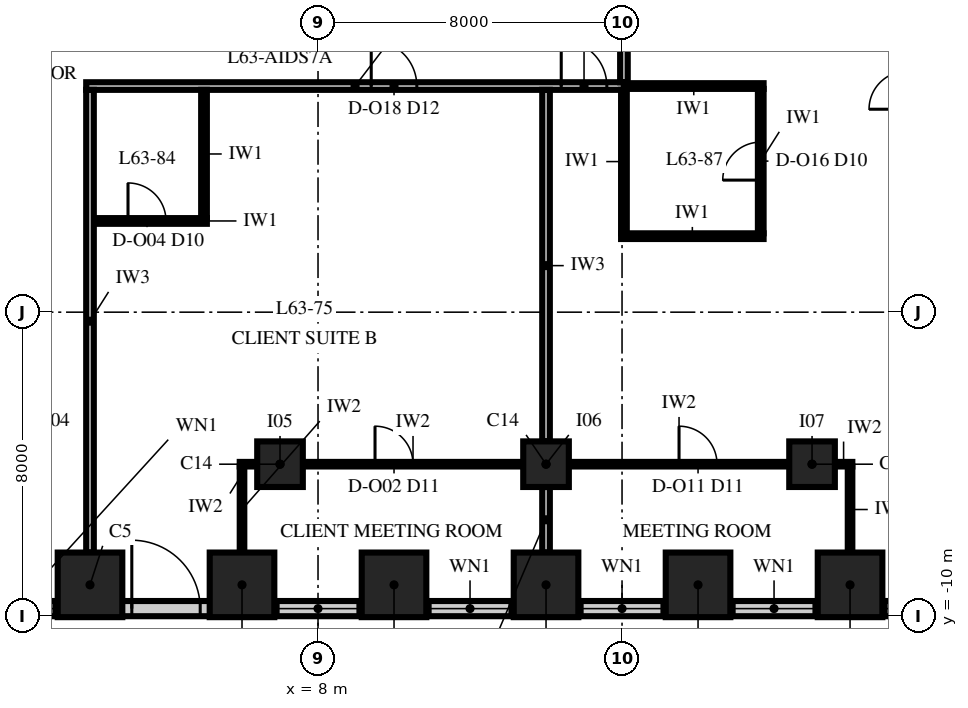
"""IFC4 building model, lengths in metres.
Left out: names, types, materials, properties, quantities, classifications, styles, units other than length and angle.
Written with IfcOpenShell. Run it as: python <this file> out.ifc"""

import sys

from ifc_helpers import new_model, si_unit, direction, frame, frame_2d, origin, origin_2d, place, context, subcontext, project, spatial, rectangle, extrude, element, fill, save


model = new_model("IFC4")
c1 = context("Model", 3, precision=1e-05, world=origin(), true_north=direction((0.0, 1.0)))
c2 = subcontext(c1, "Body", "Model", "MODEL_VIEW")
j1 = project(units=[si_unit("LENGTHUNIT", "METRE"), si_unit("PLANEANGLEUNIT", "RADIAN")], contexts=[c1])
p1 = place(None, origin())
s1 = spatial("IfcSite", under=j1, at=p1, CompositionType="ELEMENT")
p2 = place(p1, origin())
s2 = spatial("IfcBuilding", under=s1, at=p2, CompositionType="ELEMENT")
p3 = place(p2, frame((0.0, 0.0, 272.0)))
s3 = spatial("IfcBuildingStorey", under=s2, at=p3, CompositionType="ELEMENT", Elevation=272.0)
for number, where, z_axis, x_axis in (
    (1, (2.0, -9.175, -0.25), (0.0, 0.0, 1.0), (1.0, 0.0, 0.0)),
    (2, (6.0, -9.175, -0.25), (0.0, 0.0, 1.0), (1.0, 0.0, 0.0)),
    (3, (10.0, -9.175, -0.25), (0.0, 0.0, 1.0), (1.0, 0.0, 0.0)),
    (4, (14.0, -9.175, -0.25), (0.0, 0.0, 1.0), (1.0, 0.0, 0.0)),
    (5, (18.0, -9.175, -0.25), (0.0, 0.0, 1.0), (1.0, 0.0, 0.0)),
    (6, (22.0, -9.175, -0.25), (0.0, 0.0, 1.0), (1.0, 0.0, 0.0)),
):
    element("IfcColumn", number, at=place(p3, frame(where, z_axis=z_axis, x_axis=x_axis)), inside=s3, PredefinedType="COLUMN", context=c2, shape_type="SweptSolid", body=[
        extrude(rectangle(XDim=1.7, YDim=1.7, at=origin_2d()), origin(), (0.0, 0.0, 1.0), 4.25),
    ])
for number, where, z_axis, x_axis in (
    (7, (7.0, -6.0, 0.0), (0.0, 0.0, 1.0), (1.0, 0.0, 0.0)),
    (8, (14.0, -6.0, 0.0), (0.0, 0.0, 1.0), (1.0, 0.0, 0.0)),
    (9, (21.0, -6.0, 0.0), (0.0, 0.0, 1.0), (1.0, 0.0, 0.0)),
):
    element("IfcColumn", number, at=place(p3, frame(where, z_axis=z_axis, x_axis=x_axis)), inside=s3, PredefinedType="COLUMN", context=c2, shape_type="SweptSolid", body=[
        extrude(rectangle(XDim=1.2, YDim=1.2, at=origin_2d()), origin(), (0.0, 0.0, 1.0), 4.0),
    ])
p4 = place(p3, frame((-26.0, -9.8, 0.0), z_axis=(0.0, 0.0, 1.0), x_axis=(1.0, 0.0, 0.0)))
e10 = element("IfcWall", 10, at=p4, inside=s3, PredefinedType="SOLIDWALL", context=c2, shape_type="SweptSolid", body=[
    extrude(rectangle(XDim=52.0, YDim=0.4, at=frame_2d((26.0, 0.0))), origin(), (0.0, 0.0, 1.0), 2.0),
])
p5 = place(p4, frame((0.95, 0.0, 0.8)))
e11 = element("IfcOpeningElement", 11, at=p5, cuts=e10, PredefinedType="OPENING", context=c2, shape_type="SweptSolid", body=[
    extrude(rectangle(XDim=2.1, YDim=1.15, at=frame_2d((1.05, 0.575))), frame((0.0, 0.215, 0.0), z_axis=(0.0, -1.0, 0.0), x_axis=(1.0, 0.0, 0.0)), (0.0, 0.0, 1.0), 0.43),
])
p6 = place(p4, frame((4.95, 0.0, 0.8)))
e12 = element("IfcOpeningElement", 12, at=p6, cuts=e10, PredefinedType="OPENING", context=c2, shape_type="SweptSolid", body=[
    extrude(rectangle(XDim=2.1, YDim=1.15, at=frame_2d((1.05, 0.575))), frame((0.0, 0.215, 0.0), z_axis=(0.0, -1.0, 0.0), x_axis=(1.0, 0.0, 0.0)), (0.0, 0.0, 1.0), 0.43),
])
p7 = place(p4, frame((8.95, 0.0, 0.8)))
e13 = element("IfcOpeningElement", 13, at=p7, cuts=e10, PredefinedType="OPENING", context=c2, shape_type="SweptSolid", body=[
    extrude(rectangle(XDim=2.1, YDim=1.15, at=frame_2d((1.05, 0.575))), frame((0.0, 0.215, 0.0), z_axis=(0.0, -1.0, 0.0), x_axis=(1.0, 0.0, 0.0)), (0.0, 0.0, 1.0), 0.43),
])
p8 = place(p4, frame((12.95, 0.0, 0.8)))
e14 = element("IfcOpeningElement", 14, at=p8, cuts=e10, PredefinedType="OPENING", context=c2, shape_type="SweptSolid", body=[
    extrude(rectangle(XDim=2.1, YDim=1.15, at=frame_2d((1.05, 0.575))), frame((0.0, 0.215, 0.0), z_axis=(0.0, -1.0, 0.0), x_axis=(1.0, 0.0, 0.0)), (0.0, 0.0, 1.0), 0.43),
])
p9 = place(p4, frame((16.95, 0.0, 0.8)))
e15 = element("IfcOpeningElement", 15, at=p9, cuts=e10, PredefinedType="OPENING", context=c2, shape_type="SweptSolid", body=[
    extrude(rectangle(XDim=2.1, YDim=1.15, at=frame_2d((1.05, 0.575))), frame((0.0, 0.215, 0.0), z_axis=(0.0, -1.0, 0.0), x_axis=(1.0, 0.0, 0.0)), (0.0, 0.0, 1.0), 0.43),
])
p10 = place(p4, frame((21.1, 0.0, 0.0)))
e16 = element("IfcOpeningElement", 16, at=p10, cuts=e10, PredefinedType="OPENING", context=c2, shape_type="SweptSolid", body=[
    extrude(rectangle(XDim=1.8, YDim=2.0, at=frame_2d((0.9, 1.0))), frame((0.0, 0.215, 0.0), z_axis=(0.0, -1.0, 0.0), x_axis=(1.0, 0.0, 0.0)), (0.0, 0.0, 1.0), 0.43),
])
p11 = place(p4, frame((24.95, 0.0, 0.8)))
e17 = element("IfcOpeningElement", 17, at=p11, cuts=e10, PredefinedType="OPENING", context=c2, shape_type="SweptSolid", body=[
    extrude(rectangle(XDim=2.1, YDim=1.15, at=frame_2d((1.05, 0.575))), frame((0.0, 0.215, 0.0), z_axis=(0.0, -1.0, 0.0), x_axis=(1.0, 0.0, 0.0)), (0.0, 0.0, 1.0), 0.43),
])
p12 = place(p4, frame((29.1, 0.0, 0.0)))
e18 = element("IfcOpeningElement", 18, at=p12, cuts=e10, PredefinedType="OPENING", context=c2, shape_type="SweptSolid", body=[
    extrude(rectangle(XDim=1.8, YDim=2.0, at=frame_2d((0.9, 1.0))), frame((0.0, 0.215, 0.0), z_axis=(0.0, -1.0, 0.0), x_axis=(1.0, 0.0, 0.0)), (0.0, 0.0, 1.0), 0.43),
])
p13 = place(p4, frame((32.95, 0.0, 0.8)))
e19 = element("IfcOpeningElement", 19, at=p13, cuts=e10, PredefinedType="OPENING", context=c2, shape_type="SweptSolid", body=[
    extrude(rectangle(XDim=2.1, YDim=1.15, at=frame_2d((1.05, 0.575))), frame((0.0, 0.215, 0.0), z_axis=(0.0, -1.0, 0.0), x_axis=(1.0, 0.0, 0.0)), (0.0, 0.0, 1.0), 0.43),
])
p14 = place(p4, frame((36.95, 0.0, 0.8)))
e20 = element("IfcOpeningElement", 20, at=p14, cuts=e10, PredefinedType="OPENING", context=c2, shape_type="SweptSolid", body=[
    extrude(rectangle(XDim=2.1, YDim=1.15, at=frame_2d((1.05, 0.575))), frame((0.0, 0.215, 0.0), z_axis=(0.0, -1.0, 0.0), x_axis=(1.0, 0.0, 0.0)), (0.0, 0.0, 1.0), 0.43),
])
p15 = place(p4, frame((40.95, 0.0, 0.8)))
e21 = element("IfcOpeningElement", 21, at=p15, cuts=e10, PredefinedType="OPENING", context=c2, shape_type="SweptSolid", body=[
    extrude(rectangle(XDim=2.1, YDim=1.15, at=frame_2d((1.05, 0.575))), frame((0.0, 0.215, 0.0), z_axis=(0.0, -1.0, 0.0), x_axis=(1.0, 0.0, 0.0)), (0.0, 0.0, 1.0), 0.43),
])
p16 = place(p4, frame((44.95, 0.0, 0.8)))
e22 = element("IfcOpeningElement", 22, at=p16, cuts=e10, PredefinedType="OPENING", context=c2, shape_type="SweptSolid", body=[
    extrude(rectangle(XDim=2.1, YDim=1.15, at=frame_2d((1.05, 0.575))), frame((0.0, 0.215, 0.0), z_axis=(0.0, -1.0, 0.0), x_axis=(1.0, 0.0, 0.0)), (0.0, 0.0, 1.0), 0.43),
])
p17 = place(p4, frame((48.95, 0.0, 0.8)))
e23 = element("IfcOpeningElement", 23, at=p17, cuts=e10, PredefinedType="OPENING", context=c2, shape_type="SweptSolid", body=[
    extrude(rectangle(XDim=2.1, YDim=1.15, at=frame_2d((1.05, 0.575))), frame((0.0, 0.215, 0.0), z_axis=(0.0, -1.0, 0.0), x_axis=(1.0, 0.0, 0.0)), (0.0, 0.0, 1.0), 0.43),
])
p18 = place(p3, frame((5.94, -6.0, 0.0), z_axis=(0.0, 0.0, 1.0), x_axis=(1.0, 0.0, 0.0)))
e24 = element("IfcWall", 24, at=p18, inside=s3, PredefinedType="PARTITIONING", context=c2, shape_type="SweptSolid", body=[
    extrude(rectangle(XDim=0.46, YDim=0.12, at=frame_2d((0.23, 0.0))), origin(), (0.0, 0.0, 1.0), 2.842),
])
p19 = place(p3, frame((7.6, -6.0, 0.0), z_axis=(0.0, 0.0, 1.0), x_axis=(1.0, 0.0, 0.0)))
e25 = element("IfcWall", 25, at=p19, inside=s3, PredefinedType="PARTITIONING", context=c2, shape_type="SweptSolid", body=[
    extrude(rectangle(XDim=5.8, YDim=0.12, at=frame_2d((2.9, 0.0))), origin(), (0.0, 0.0, 1.0), 2.842),
])
p20 = place(p19, frame((1.9, 0.0, 0.0)))
e26 = element("IfcOpeningElement", 26, at=p20, cuts=e25, PredefinedType="OPENING", context=c2, shape_type="SweptSolid", body=[
    extrude(rectangle(XDim=1.0, YDim=2.4, at=frame_2d((0.5, 1.2))), frame((0.0, 0.075, 0.0), z_axis=(0.0, -1.0, 0.0), x_axis=(1.0, 0.0, 0.0)), (0.0, 0.0, 1.0), 0.15),
])
p21 = place(p3, frame((14.6, -6.0, 0.0), z_axis=(0.0, 0.0, 1.0), x_axis=(1.0, 0.0, 0.0)))
e27 = element("IfcWall", 27, at=p21, inside=s3, PredefinedType="PARTITIONING", context=c2, shape_type="SweptSolid", body=[
    extrude(rectangle(XDim=5.8, YDim=0.12, at=frame_2d((2.9, 0.0))), origin(), (0.0, 0.0, 1.0), 2.842),
])
p22 = place(p21, frame((2.9, 0.0, 0.0)))
e28 = element("IfcOpeningElement", 28, at=p22, cuts=e27, PredefinedType="OPENING", context=c2, shape_type="SweptSolid", body=[
    extrude(rectangle(XDim=1.0, YDim=2.4, at=frame_2d((0.5, 1.2))), frame((0.0, 0.075, 0.0), z_axis=(0.0, -1.0, 0.0), x_axis=(1.0, 0.0, 0.0)), (0.0, 0.0, 1.0), 0.15),
])
p23 = place(p3, frame((21.6, -6.0, 0.0), z_axis=(0.0, 0.0, 1.0), x_axis=(1.0, 0.0, 0.0)))
e29 = element("IfcWall", 29, at=p23, inside=s3, PredefinedType="PARTITIONING", context=c2, shape_type="SweptSolid", body=[
    extrude(rectangle(XDim=0.46, YDim=0.12, at=frame_2d((0.23, 0.0))), origin(), (0.0, 0.0, 1.0), 2.842),
])
p24 = place(p3, frame((15.975, 0.0, 0.0), z_axis=(0.0, 0.0, 1.0), x_axis=(1.0, 0.0, 0.0)))
e30 = element("IfcWall", 30, at=p24, inside=s3, PredefinedType="PARTITIONING", context=c2, shape_type="SweptSolid", body=[
    extrude(rectangle(XDim=3.75, YDim=0.15, at=frame_2d((1.875, 0.0))), origin(), (0.0, 0.0, 1.0), 3.23),
])
p25 = place(p3, frame((2.1, 0.4, 0.0), z_axis=(0.0, 0.0, 1.0), x_axis=(1.0, 0.0, 0.0)))
e31 = element("IfcWall", 31, at=p25, inside=s3, PredefinedType="PARTITIONING", context=c2, shape_type="SweptSolid", body=[
    extrude(rectangle(XDim=2.975, YDim=0.15, at=frame_2d((1.487, 0.0))), origin(), (0.0, 0.0, 1.0), 3.23),
])
p26 = place(p25, frame((0.9, 0.0, 0.0)))
e32 = element("IfcOpeningElement", 32, at=p26, cuts=e31, PredefinedType="OPENING", context=c2, shape_type="SweptSolid", body=[
    extrude(rectangle(XDim=1.0, YDim=2.3, at=frame_2d((0.5, 1.15))), frame((0.0, 0.09, 0.0), z_axis=(0.0, -1.0, 0.0), x_axis=(1.0, 0.0, 0.0)), (0.0, 0.0, 1.0), 0.18),
])
p27 = place(p3, frame((1.9, 3.95, 0.0), z_axis=(0.0, 0.0, 1.0), x_axis=(1.0, 0.0, 0.0)))
e33 = element("IfcWall", 33, at=p27, inside=s3, PredefinedType="PARTITIONING", context=c2, shape_type="SweptSolid", body=[
    extrude(rectangle(XDim=14.15, YDim=0.2, at=frame_2d((7.075, 0.0))), origin(), (0.0, 0.0, 1.0), 3.23),
])
p28 = place(p27, frame((7.5, 0.0, 0.0)))
e34 = element("IfcOpeningElement", 34, at=p28, cuts=e33, PredefinedType="OPENING", context=c2, shape_type="SweptSolid", body=[
    extrude(rectangle(XDim=1.2, YDim=2.4, at=frame_2d((0.6, 1.2))), frame((0.0, 0.115, 0.0), z_axis=(0.0, -1.0, 0.0), x_axis=(1.0, 0.0, 0.0)), (0.0, 0.0, 1.0), 0.23),
])
p29 = place(p27, frame((12.5, 0.0, 0.0)))
e35 = element("IfcOpeningElement", 35, at=p29, cuts=e33, PredefinedType="OPENING", context=c2, shape_type="SweptSolid", body=[
    extrude(rectangle(XDim=1.2, YDim=2.4, at=frame_2d((0.6, 1.2))), frame((0.0, 0.115, 0.0), z_axis=(0.0, -1.0, 0.0), x_axis=(1.0, 0.0, 0.0)), (0.0, 0.0, 1.0), 0.23),
])
p30 = place(p3, frame((16.05, 3.95, 0.0), z_axis=(0.0, 0.0, 1.0), x_axis=(1.0, 0.0, 0.0)))
e36 = element("IfcWall", 36, at=p30, inside=s3, PredefinedType="PARTITIONING", context=c2, shape_type="SweptSolid", body=[
    extrude(rectangle(XDim=3.675, YDim=0.15, at=frame_2d((1.837, 0.0))), origin(), (0.0, 0.0, 1.0), 3.23),
])
p31 = place(p3, frame((2.0, -8.325, 0.0), z_axis=(0.0, 0.0, 1.0), x_axis=(0.0, 1.0, 0.0)))
e37 = element("IfcWall", 37, at=p31, inside=s3, PredefinedType="PARTITIONING", context=c2, shape_type="SweptSolid", body=[
    extrude(rectangle(XDim=12.175, YDim=0.2, at=frame_2d((6.087, 0.0))), origin(), (0.0, 0.0, 1.0), 2.842),
])
p32 = place(p3, frame((5.0, 0.475, 0.0), z_axis=(0.0, 0.0, 1.0), x_axis=(0.0, 1.0, 0.0)))
e38 = element("IfcWall", 38, at=p32, inside=s3, PredefinedType="PARTITIONING", context=c2, shape_type="SweptSolid", body=[
    extrude(rectangle(XDim=3.375, YDim=0.15, at=frame_2d((1.688, 0.0))), origin(), (0.0, 0.0, 1.0), 3.85),
])
p33 = place(p3, frame((6.0, -8.325, 0.0), z_axis=(0.0, 0.0, 1.0), x_axis=(0.0, 1.0, 0.0)))
e39 = element("IfcWall", 39, at=p33, inside=s3, PredefinedType="PARTITIONING", context=c2, shape_type="SweptSolid", body=[
    extrude(rectangle(XDim=2.265, YDim=0.12, at=frame_2d((1.132, 0.0))), origin(), (0.0, 0.0, 1.0), 2.842),
])
p34 = place(p3, frame((14.0, -8.325, 0.0), z_axis=(0.0, 0.0, 1.0), x_axis=(0.0, 1.0, 0.0)))
e40 = element("IfcWall", 40, at=p34, inside=s3, PredefinedType="PARTITIONING", context=c2, shape_type="SweptSolid", body=[
    extrude(rectangle(XDim=1.725, YDim=0.2, at=frame_2d((0.862, 0.0))), origin(), (0.0, 0.0, 1.0), 3.23),
])
p35 = place(p3, frame((14.0, -5.4, 0.0), z_axis=(0.0, 0.0, 1.0), x_axis=(0.0, 1.0, 0.0)))
e41 = element("IfcWall", 41, at=p35, inside=s3, PredefinedType="PARTITIONING", context=c2, shape_type="SweptSolid", body=[
    extrude(rectangle(XDim=9.25, YDim=0.2, at=frame_2d((4.625, 0.0))), origin(), (0.0, 0.0, 1.0), 3.23),
])
p36 = place(p3, frame((16.05, 0.075, 0.0), z_axis=(0.0, 0.0, 1.0), x_axis=(0.0, 1.0, 0.0)))
e42 = element("IfcWall", 42, at=p36, inside=s3, PredefinedType="PARTITIONING", context=c2, shape_type="SweptSolid", body=[
    extrude(rectangle(XDim=3.775, YDim=0.15, at=frame_2d((1.888, 0.0))), origin(), (0.0, 0.0, 1.0), 3.85),
])
p37 = place(p3, frame((16.05, 4.05, 0.0), z_axis=(0.0, 0.0, 1.0), x_axis=(0.0, 1.0, 0.0)))
e43 = element("IfcWall", 43, at=p37, inside=s3, PredefinedType="PARTITIONING", context=c2, shape_type="SweptSolid", body=[
    extrude(rectangle(XDim=21.9, YDim=0.2, at=frame_2d((10.95, 0.0))), origin(), (0.0, 0.0, 1.0), 2.842),
])
p38 = place(p37, frame((20.35, 0.0, 0.0)))
e44 = element("IfcOpeningElement", 44, at=p38, cuts=e43, PredefinedType="OPENING", context=c2, shape_type="SweptSolid", body=[
    extrude(rectangle(XDim=1.2, YDim=2.4, at=frame_2d((0.6, 1.2))), frame((0.0, 0.115, 0.0), z_axis=(0.0, -1.0, 0.0), x_axis=(1.0, 0.0, 0.0)), (0.0, 0.0, 1.0), 0.23),
])
p39 = place(p3, frame((19.65, 0.075, 0.0), z_axis=(0.0, 0.0, 1.0), x_axis=(0.0, 1.0, 0.0)))
e45 = element("IfcWall", 45, at=p39, inside=s3, PredefinedType="PARTITIONING", context=c2, shape_type="SweptSolid", body=[
    extrude(rectangle(XDim=3.8, YDim=0.15, at=frame_2d((1.9, 0.0))), origin(), (0.0, 0.0, 1.0), 3.85),
])
p40 = place(p39, frame((1.4, 0.0, 0.0)))
e46 = element("IfcOpeningElement", 46, at=p40, cuts=e45, PredefinedType="OPENING", context=c2, shape_type="SweptSolid", body=[
    extrude(rectangle(XDim=1.0, YDim=2.3, at=frame_2d((0.5, 1.15))), frame((0.0, 0.09, 0.0), z_axis=(0.0, -1.0, 0.0), x_axis=(1.0, 0.0, 0.0)), (0.0, 0.0, 1.0), 0.18),
])
p41 = place(p3, frame((22.0, -8.325, 0.0), z_axis=(0.0, 0.0, 1.0), x_axis=(0.0, 1.0, 0.0)))
e47 = element("IfcWall", 47, at=p41, inside=s3, PredefinedType="PARTITIONING", context=c2, shape_type="SweptSolid", body=[
    extrude(rectangle(XDim=2.265, YDim=0.12, at=frame_2d((1.132, 0.0))), origin(), (0.0, 0.0, 1.0), 2.842),
])
p42 = place(p11, origin())
e48 = element("IfcWindow", 48, at=p42, inside=s3, PartitioningType="SINGLE_PANEL", PredefinedType="WINDOW", context=c2, shape_type="SweptSolid", body=[
    extrude(rectangle(XDim=2.1, YDim=1.15, at=frame_2d((1.05, 0.575))), frame((0.0, 0.03, 0.0), z_axis=(0.0, -1.0, 0.0), x_axis=(1.0, 0.0, 0.0)), (0.0, 0.0, 1.0), 0.06),
])
fill(e17, e48)
p43 = place(p12, origin())
e49 = element("IfcDoor", 49, at=p43, inside=s3, OperationType="DOUBLE_DOOR_SINGLE_SWING", PredefinedType="DOOR", context=c2, shape_type="SweptSolid", body=[
    extrude(rectangle(XDim=1.8, YDim=2.0, at=frame_2d((0.9, 1.0))), frame((0.0, 0.2, 0.0), z_axis=(0.0, -1.0, 0.0), x_axis=(1.0, 0.0, 0.0)), (0.0, 0.0, 1.0), 0.399),
])
fill(e18, e49)
p44 = place(p13, origin())
e50 = element("IfcWindow", 50, at=p44, inside=s3, PartitioningType="SINGLE_PANEL", PredefinedType="WINDOW", context=c2, shape_type="SweptSolid", body=[
    extrude(rectangle(XDim=2.1, YDim=1.15, at=frame_2d((1.05, 0.575))), frame((0.0, 0.03, 0.0), z_axis=(0.0, -1.0, 0.0), x_axis=(1.0, 0.0, 0.0)), (0.0, 0.0, 1.0), 0.06),
])
fill(e19, e50)
p45 = place(p14, origin())
e51 = element("IfcWindow", 51, at=p45, inside=s3, PartitioningType="SINGLE_PANEL", PredefinedType="WINDOW", context=c2, shape_type="SweptSolid", body=[
    extrude(rectangle(XDim=2.1, YDim=1.15, at=frame_2d((1.05, 0.575))), frame((0.0, 0.03, 0.0), z_axis=(0.0, -1.0, 0.0), x_axis=(1.0, 0.0, 0.0)), (0.0, 0.0, 1.0), 0.06),
])
fill(e20, e51)
p46 = place(p15, origin())
e52 = element("IfcWindow", 52, at=p46, inside=s3, PartitioningType="SINGLE_PANEL", PredefinedType="WINDOW", context=c2, shape_type="SweptSolid", body=[
    extrude(rectangle(XDim=2.1, YDim=1.15, at=frame_2d((1.05, 0.575))), frame((0.0, 0.03, 0.0), z_axis=(0.0, -1.0, 0.0), x_axis=(1.0, 0.0, 0.0)), (0.0, 0.0, 1.0), 0.06),
])
fill(e21, e52)
p47 = place(p16, origin())
e53 = element("IfcWindow", 53, at=p47, inside=s3, PartitioningType="SINGLE_PANEL", PredefinedType="WINDOW", context=c2, shape_type="SweptSolid", body=[
    extrude(rectangle(XDim=2.1, YDim=1.15, at=frame_2d((1.05, 0.575))), frame((0.0, 0.03, 0.0), z_axis=(0.0, -1.0, 0.0), x_axis=(1.0, 0.0, 0.0)), (0.0, 0.0, 1.0), 0.06),
])
fill(e22, e53)
p48 = place(p17, origin())
e54 = element("IfcWindow", 54, at=p48, inside=s3, PartitioningType="SINGLE_PANEL", PredefinedType="WINDOW", context=c2, shape_type="SweptSolid", body=[
    extrude(rectangle(XDim=2.1, YDim=1.15, at=frame_2d((1.05, 0.575))), frame((0.0, 0.03, 0.0), z_axis=(0.0, -1.0, 0.0), x_axis=(1.0, 0.0, 0.0)), (0.0, 0.0, 1.0), 0.06),
])
fill(e23, e54)
p49 = place(p20, origin())
e55 = element("IfcDoor", 55, at=p49, inside=s3, OperationType="SINGLE_SWING_RIGHT", PredefinedType="DOOR", context=c2, shape_type="SweptSolid", body=[
    extrude(rectangle(XDim=1.0, YDim=2.4, at=frame_2d((0.5, 1.2))), frame((0.0, 0.06, 0.0), z_axis=(0.0, -1.0, 0.0), x_axis=(1.0, 0.0, 0.0)), (0.0, 0.0, 1.0), 0.12),
])
fill(e26, e55)
p50 = place(p26, origin())
e56 = element("IfcDoor", 56, at=p50, inside=s3, OperationType="SINGLE_SWING_LEFT", PredefinedType="DOOR", context=c2, shape_type="SweptSolid", body=[
    extrude(rectangle(XDim=1.0, YDim=2.3, at=frame_2d((0.5, 1.15))), frame((0.0, 0.075, 0.0), z_axis=(0.0, -1.0, 0.0), x_axis=(1.0, 0.0, 0.0)), (0.0, 0.0, 1.0), 0.149),
])
fill(e32, e56)
p51 = place(p22, origin())
e57 = element("IfcDoor", 57, at=p51, inside=s3, OperationType="SINGLE_SWING_RIGHT", PredefinedType="DOOR", context=c2, shape_type="SweptSolid", body=[
    extrude(rectangle(XDim=1.0, YDim=2.4, at=frame_2d((0.5, 1.2))), frame((0.0, 0.06, 0.0), z_axis=(0.0, -1.0, 0.0), x_axis=(1.0, 0.0, 0.0)), (0.0, 0.0, 1.0), 0.12),
])
fill(e28, e57)
p52 = place(p40, origin())
e58 = element("IfcDoor", 58, at=p52, inside=s3, OperationType="SINGLE_SWING_LEFT", PredefinedType="DOOR", context=c2, shape_type="SweptSolid", body=[
    extrude(rectangle(XDim=1.0, YDim=2.3, at=frame_2d((0.5, 1.15))), frame((0.0, 0.075, 0.0), z_axis=(0.0, -1.0, 0.0), x_axis=(1.0, 0.0, 0.0)), (0.0, 0.0, 1.0), 0.149),
])
fill(e46, e58)
p53 = place(p28, origin())
e59 = element("IfcDoor", 59, at=p53, inside=s3, OperationType="SINGLE_SWING_LEFT", PredefinedType="DOOR", context=c2, shape_type="SweptSolid", body=[
    extrude(rectangle(XDim=1.2, YDim=2.4, at=frame_2d((0.6, 1.2))), frame((0.0, 0.1, 0.0), z_axis=(0.0, -1.0, 0.0), x_axis=(1.0, 0.0, 0.0)), (0.0, 0.0, 1.0), 0.199),
])
fill(e34, e59)
p54 = place(p29, origin())
e60 = element("IfcDoor", 60, at=p54, inside=s3, OperationType="SINGLE_SWING_LEFT", PredefinedType="DOOR", context=c2, shape_type="SweptSolid", body=[
    extrude(rectangle(XDim=1.2, YDim=2.4, at=frame_2d((0.6, 1.2))), frame((0.0, 0.1, 0.0), z_axis=(0.0, -1.0, 0.0), x_axis=(1.0, 0.0, 0.0)), (0.0, 0.0, 1.0), 0.199),
])
fill(e35, e60)
save(model, sys.argv[1])
